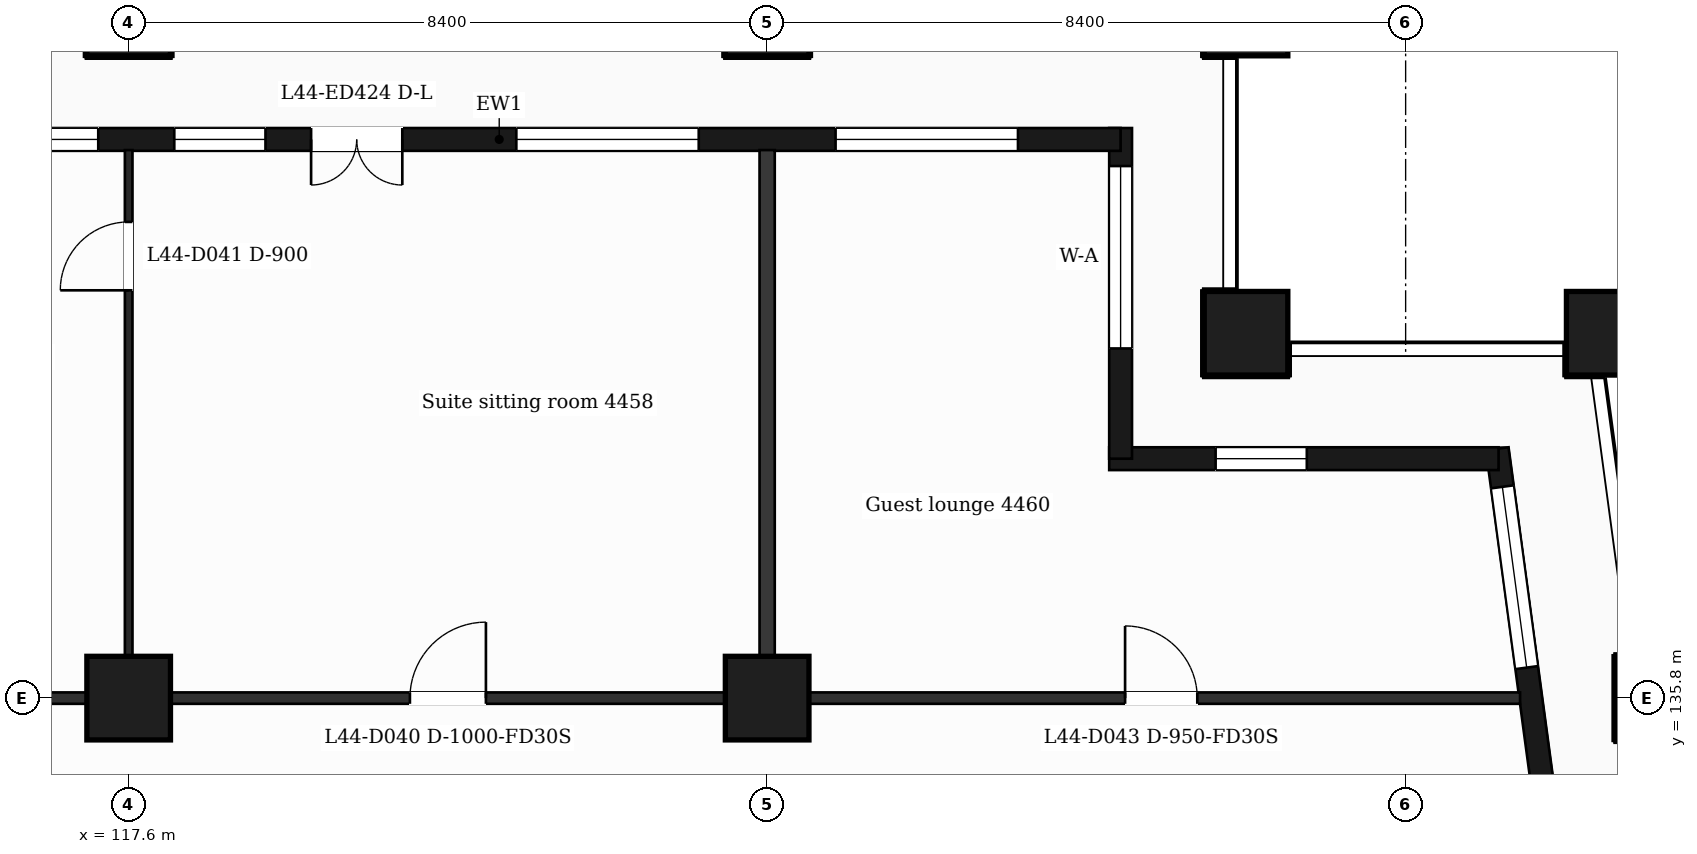
"""IFC4 building model, lengths in metres.
Left out: names, types, materials, properties, quantities, classifications, styles, units other than length and angle.
Written with IfcOpenShell. Run it as: python <this file> out.ifc"""

import sys

from ifc_helpers import new_model, si_unit, direction, frame, frame_2d, origin, origin_2d, place, context, subcontext, project, spatial, rectangle, extrude, element, fill, save


model = new_model("IFC4")
c1 = context("Model", 3, precision=1e-05, world=origin(), true_north=direction((0.0, 1.0)))
c2 = subcontext(c1, "Body", "Model", "MODEL_VIEW")
j1 = project(units=[si_unit("LENGTHUNIT", "METRE"), si_unit("PLANEANGLEUNIT", "RADIAN")], contexts=[c1])
p1 = place(None, origin())
s1 = spatial("IfcSite", under=j1, at=p1, CompositionType="ELEMENT")
p2 = place(p1, origin())
s2 = spatial("IfcBuilding", under=s1, at=p2, CompositionType="ELEMENT")
p3 = place(p2, frame((0.0, 0.0, 184.8)))
s3 = spatial("IfcBuildingStorey", under=s2, at=p3, CompositionType="ELEMENT", Elevation=184.8)
for number, where, z_axis, x_axis in (
    (1, (132.3, 140.6, 0.0), (0.0, 0.0, 1.0), (1.0, 0.0, 0.0)),
    (2, (137.065, 140.6, 0.0), (0.0, 0.0, 1.0), (1.0, 0.0, 0.0)),
    (3, (117.6, 135.8, 0.0), (0.0, 0.0, 1.0), (1.0, 0.0, 0.0)),
    (4, (126.0, 135.8, 0.0), (0.0, 0.0, 1.0), (1.0, 0.0, 0.0)),
    (5, (137.711, 135.8, 0.0), (0.0, 0.0, 1.0), (1.0, 0.0, 0.0)),
    (6, (117.6, 144.8, 0.0), (0.0, 0.0, 1.0), (1.0, 0.0, 0.0)),
    (7, (126.0, 144.8, 0.0), (0.0, 0.0, 1.0), (1.0, 0.0, 0.0)),
    (8, (132.3, 144.8, 0.0), (0.0, 0.0, 1.0), (1.0, 0.0, 0.0)),
):
    element("IfcColumn", number, at=place(p3, frame(where, z_axis=z_axis, x_axis=x_axis)), inside=s3, PredefinedType="COLUMN", context=c2, shape_type="SweptSolid", body=[
        extrude(rectangle(XDim=1.1, YDim=1.1, at=origin_2d()), origin(), (0.0, 0.0, 1.0), 3.7),
    ])
p4 = place(p3, frame((136.504, 132.4, 0.0), z_axis=(0.0, 0.0, 1.0), x_axis=(-0.133399697462, 0.99106231929, 0.0)))
e9 = element("IfcWall", 9, at=p4, inside=s3, PredefinedType="SOLIDWALL", context=c2, shape_type="SweptSolid", body=[
    extrude(rectangle(XDim=6.74, YDim=0.3, at=frame_2d((3.37, 0.0))), origin(), (0.0, 0.0, 1.0), 3.38),
])
p5 = place(p4, frame((1.115, 0.0, 0.0)))
e10 = element("IfcOpeningElement", 10, at=p5, cuts=e9, PredefinedType="OPENING", context=c2, shape_type="SweptSolid", body=[
    extrude(rectangle(XDim=1.2, YDim=2.4, at=frame_2d((0.6, 1.2))), frame((0.0, 0.16, 0.0), z_axis=(0.0, -1.0, 0.0), x_axis=(1.0, 0.0, 0.0)), (0.0, 0.0, 1.0), 0.32),
])
p6 = place(p4, frame((3.835, 0.0, 0.9)))
e11 = element("IfcOpeningElement", 11, at=p6, cuts=e9, PredefinedType="OPENING", context=c2, shape_type="SweptSolid", body=[
    extrude(rectangle(XDim=2.4, YDim=2.1, at=frame_2d((1.2, 1.05))), frame((0.0, 0.16, 0.0), z_axis=(0.0, -1.0, 0.0), x_axis=(1.0, 0.0, 0.0)), (0.0, 0.0, 1.0), 0.32),
])
p7 = place(p3, frame((135.623, 138.95, 0.0), z_axis=(0.0, 0.0, 1.0), x_axis=(-1.0, 0.0, 0.0)))
e12 = element("IfcWall", 12, at=p7, inside=s3, PredefinedType="SOLIDWALL", context=c2, shape_type="SweptSolid", body=[
    extrude(rectangle(XDim=5.123, YDim=0.3, at=frame_2d((2.561, 0.0))), origin(), (0.0, 0.0, 1.0), 3.38),
])
p8 = place(p7, frame((2.523, 0.0, 0.9)))
e13 = element("IfcOpeningElement", 13, at=p8, cuts=e12, PredefinedType="OPENING", context=c2, shape_type="SweptSolid", body=[
    extrude(rectangle(XDim=1.2, YDim=2.1, at=frame_2d((0.6, 1.05))), frame((0.0, 0.16, 0.0), z_axis=(0.0, -1.0, 0.0), x_axis=(1.0, 0.0, 0.0)), (0.0, 0.0, 1.0), 0.32),
])
p9 = place(p3, frame((130.65, 138.95, 0.0), z_axis=(0.0, 0.0, 1.0), x_axis=(0.0, 1.0, 0.0)))
e14 = element("IfcWall", 14, at=p9, inside=s3, PredefinedType="SOLIDWALL", context=c2, shape_type="SweptSolid", body=[
    extrude(rectangle(XDim=4.35, YDim=0.3, at=frame_2d((2.175, 0.0))), origin(), (0.0, 0.0, 1.0), 3.38),
])
p10 = place(p9, frame((1.45, 0.0, 0.9)))
e15 = element("IfcOpeningElement", 15, at=p10, cuts=e14, PredefinedType="OPENING", context=c2, shape_type="SweptSolid", body=[
    extrude(rectangle(XDim=2.4, YDim=2.1, at=frame_2d((1.2, 1.05))), frame((0.0, 0.16, 0.0), z_axis=(0.0, -1.0, 0.0), x_axis=(1.0, 0.0, 0.0)), (0.0, 0.0, 1.0), 0.32),
])
p11 = place(p3, frame((130.65, 143.15, 0.0), z_axis=(0.0, 0.0, 1.0), x_axis=(-1.0, 0.0, 0.0)))
e16 = element("IfcWall", 16, at=p11, inside=s3, PredefinedType="SOLIDWALL", context=c2, shape_type="SweptSolid", body=[
    extrude(rectangle(XDim=16.35, YDim=0.3, at=frame_2d((8.175, 0.0))), origin(), (0.0, 0.0, 1.0), 3.38),
])
p12 = place(p11, frame((1.35, 0.0, 0.9)))
e17 = element("IfcOpeningElement", 17, at=p12, cuts=e16, PredefinedType="OPENING", context=c2, shape_type="SweptSolid", body=[
    extrude(rectangle(XDim=2.4, YDim=2.1, at=frame_2d((1.2, 1.05))), frame((0.0, 0.16, 0.0), z_axis=(0.0, -1.0, 0.0), x_axis=(1.0, 0.0, 0.0)), (0.0, 0.0, 1.0), 0.32),
])
p13 = place(p11, frame((5.55, 0.0, 0.9)))
e18 = element("IfcOpeningElement", 18, at=p13, cuts=e16, PredefinedType="OPENING", context=c2, shape_type="SweptSolid", body=[
    extrude(rectangle(XDim=2.4, YDim=2.1, at=frame_2d((1.2, 1.05))), frame((0.0, 0.16, 0.0), z_axis=(0.0, -1.0, 0.0), x_axis=(1.0, 0.0, 0.0)), (0.0, 0.0, 1.0), 0.32),
])
p14 = place(p11, frame((9.45, 0.0, 0.0)))
e19 = element("IfcOpeningElement", 19, at=p14, cuts=e16, PredefinedType="OPENING", context=c2, shape_type="SweptSolid", body=[
    extrude(rectangle(XDim=1.2, YDim=2.4, at=frame_2d((0.6, 1.2))), frame((0.0, 0.16, 0.0), z_axis=(0.0, -1.0, 0.0), x_axis=(1.0, 0.0, 0.0)), (0.0, 0.0, 1.0), 0.32),
])
p15 = place(p11, frame((11.25, 0.0, 0.9)))
e20 = element("IfcOpeningElement", 20, at=p15, cuts=e16, PredefinedType="OPENING", context=c2, shape_type="SweptSolid", body=[
    extrude(rectangle(XDim=1.2, YDim=2.1, at=frame_2d((0.6, 1.05))), frame((0.0, 0.16, 0.0), z_axis=(0.0, -1.0, 0.0), x_axis=(1.0, 0.0, 0.0)), (0.0, 0.0, 1.0), 0.32),
])
p16 = place(p11, frame((13.45, 0.0, 0.9)))
e21 = element("IfcOpeningElement", 21, at=p16, cuts=e16, PredefinedType="OPENING", context=c2, shape_type="SweptSolid", body=[
    extrude(rectangle(XDim=2.4, YDim=2.1, at=frame_2d((1.2, 1.05))), frame((0.0, 0.16, 0.0), z_axis=(0.0, -1.0, 0.0), x_axis=(1.0, 0.0, 0.0)), (0.0, 0.0, 1.0), 0.32),
])
p17 = place(p3, frame((90.895, 135.8, 0.0), z_axis=(0.0, 0.0, 1.0), x_axis=(1.0, 0.0, 0.0)))
e22 = element("IfcWall", 22, at=p17, inside=s3, PredefinedType="PARTITIONING", context=c2, shape_type="SweptSolid", body=[
    extrude(rectangle(XDim=45.011, YDim=0.15, at=frame_2d((22.505, 0.0))), origin(), (0.0, 0.0, 1.0), 3.38),
])
p18 = place(p17, frame((6.906, 0.0, 0.0)))
e23 = element("IfcOpeningElement", 23, at=p18, cuts=e22, PredefinedType="OPENING", context=c2, shape_type="SweptSolid", body=[
    extrude(rectangle(XDim=1.0, YDim=2.1, at=frame_2d((0.5, 1.05))), frame((0.0, 0.085, 0.0), z_axis=(0.0, -1.0, 0.0), x_axis=(1.0, 0.0, 0.0)), (0.0, 0.0, 1.0), 0.17),
])
p19 = place(p17, frame((10.705, 0.0, 0.0)))
e24 = element("IfcOpeningElement", 24, at=p19, cuts=e22, PredefinedType="OPENING", context=c2, shape_type="SweptSolid", body=[
    extrude(rectangle(XDim=0.95, YDim=2.1, at=frame_2d((0.475, 1.05))), frame((0.0, 0.085, 0.0), z_axis=(0.0, -1.0, 0.0), x_axis=(1.0, 0.0, 0.0)), (0.0, 0.0, 1.0), 0.17),
])
p20 = place(p17, frame((16.555, 0.0, 0.0)))
e25 = element("IfcOpeningElement", 25, at=p20, cuts=e22, PredefinedType="OPENING", context=c2, shape_type="SweptSolid", body=[
    extrude(rectangle(XDim=0.95, YDim=2.1, at=frame_2d((0.475, 1.05))), frame((0.0, 0.085, 0.0), z_axis=(0.0, -1.0, 0.0), x_axis=(1.0, 0.0, 0.0)), (0.0, 0.0, 1.0), 0.17),
])
p21 = place(p17, frame((21.095, 0.0, 0.0)))
e26 = element("IfcOpeningElement", 26, at=p21, cuts=e22, PredefinedType="OPENING", context=c2, shape_type="SweptSolid", body=[
    extrude(rectangle(XDim=1.0, YDim=2.1, at=frame_2d((0.5, 1.05))), frame((0.0, 0.085, 0.0), z_axis=(0.0, -1.0, 0.0), x_axis=(1.0, 0.0, 0.0)), (0.0, 0.0, 1.0), 0.17),
])
p22 = place(p17, frame((30.406, 0.0, 0.0)))
e27 = element("IfcOpeningElement", 27, at=p22, cuts=e22, PredefinedType="OPENING", context=c2, shape_type="SweptSolid", body=[
    extrude(rectangle(XDim=1.0, YDim=2.1, at=frame_2d((0.5, 1.05))), frame((0.0, 0.085, 0.0), z_axis=(0.0, -1.0, 0.0), x_axis=(1.0, 0.0, 0.0)), (0.0, 0.0, 1.0), 0.17),
])
p23 = place(p17, frame((39.814, 0.0, 0.0)))
e28 = element("IfcOpeningElement", 28, at=p23, cuts=e22, PredefinedType="OPENING", context=c2, shape_type="SweptSolid", body=[
    extrude(rectangle(XDim=0.95, YDim=2.1, at=frame_2d((0.475, 1.05))), frame((0.0, 0.085, 0.0), z_axis=(0.0, -1.0, 0.0), x_axis=(1.0, 0.0, 0.0)), (0.0, 0.0, 1.0), 0.17),
])
p24 = place(p3, frame((117.6, 135.875, 0.0), z_axis=(0.0, 0.0, 1.0), x_axis=(0.0, 1.0, 0.0)))
e29 = element("IfcWall", 29, at=p24, inside=s3, PredefinedType="PARTITIONING", context=c2, shape_type="SweptSolid", body=[
    extrude(rectangle(XDim=7.135, YDim=0.1, at=frame_2d((3.567, 0.0))), origin(), (0.0, 0.0, 1.0), 3.38),
])
p25 = place(p24, frame((5.29, 0.0, 0.0)))
e30 = element("IfcOpeningElement", 30, at=p25, cuts=e29, PredefinedType="OPENING", context=c2, shape_type="SweptSolid", body=[
    extrude(rectangle(XDim=0.9, YDim=2.1, at=frame_2d((0.45, 1.05))), frame((0.0, 0.06, 0.0), z_axis=(0.0, -1.0, 0.0), x_axis=(1.0, 0.0, 0.0)), (0.0, 0.0, 1.0), 0.12),
])
p26 = place(p3, frame((126.0, 135.875, 0.0), z_axis=(0.0, 0.0, 1.0), x_axis=(0.0, 1.0, 0.0)))
e31 = element("IfcWall", 31, at=p26, inside=s3, PredefinedType="PARTITIONING", context=c2, shape_type="SweptSolid", body=[
    extrude(rectangle(XDim=7.135, YDim=0.2, at=frame_2d((3.567, 0.0))), origin(), (0.0, 0.0, 1.0), 3.38),
])
p27 = place(p6, origin())
e32 = element("IfcWindow", 32, at=p27, inside=s3, PartitioningType="SINGLE_PANEL", PredefinedType="WINDOW", context=c2, shape_type="SweptSolid", body=[
    extrude(rectangle(XDim=2.4, YDim=2.1, at=frame_2d((1.2, 1.05))), frame((0.0, 0.03, 0.0), z_axis=(0.0, -1.0, 0.0), x_axis=(1.0, 0.0, 0.0)), (0.0, 0.0, 1.0), 0.06),
])
fill(e11, e32)
p28 = place(p8, origin())
e33 = element("IfcWindow", 33, at=p28, inside=s3, PartitioningType="SINGLE_PANEL", PredefinedType="WINDOW", context=c2, shape_type="SweptSolid", body=[
    extrude(rectangle(XDim=1.2, YDim=2.1, at=frame_2d((0.6, 1.05))), frame((0.0, 0.03, 0.0), z_axis=(0.0, -1.0, 0.0), x_axis=(1.0, 0.0, 0.0)), (0.0, 0.0, 1.0), 0.06),
])
fill(e13, e33)
p29 = place(p10, origin())
e34 = element("IfcWindow", 34, at=p29, inside=s3, PartitioningType="SINGLE_PANEL", PredefinedType="WINDOW", context=c2, shape_type="SweptSolid", body=[
    extrude(rectangle(XDim=2.4, YDim=2.1, at=frame_2d((1.2, 1.05))), frame((0.0, 0.03, 0.0), z_axis=(0.0, -1.0, 0.0), x_axis=(1.0, 0.0, 0.0)), (0.0, 0.0, 1.0), 0.06),
])
fill(e15, e34)
p30 = place(p12, origin())
e35 = element("IfcWindow", 35, at=p30, inside=s3, PartitioningType="SINGLE_PANEL", PredefinedType="WINDOW", context=c2, shape_type="SweptSolid", body=[
    extrude(rectangle(XDim=2.4, YDim=2.1, at=frame_2d((1.2, 1.05))), frame((0.0, 0.03, 0.0), z_axis=(0.0, -1.0, 0.0), x_axis=(1.0, 0.0, 0.0)), (0.0, 0.0, 1.0), 0.06),
])
fill(e17, e35)
p31 = place(p13, origin())
e36 = element("IfcWindow", 36, at=p31, inside=s3, PartitioningType="SINGLE_PANEL", PredefinedType="WINDOW", context=c2, shape_type="SweptSolid", body=[
    extrude(rectangle(XDim=2.4, YDim=2.1, at=frame_2d((1.2, 1.05))), frame((0.0, 0.03, 0.0), z_axis=(0.0, -1.0, 0.0), x_axis=(1.0, 0.0, 0.0)), (0.0, 0.0, 1.0), 0.06),
])
fill(e18, e36)
p32 = place(p14, origin())
e37 = element("IfcDoor", 37, at=p32, inside=s3, OperationType="DOUBLE_DOOR_SINGLE_SWING", PredefinedType="DOOR", context=c2, shape_type="SweptSolid", body=[
    extrude(rectangle(XDim=1.2, YDim=2.4, at=frame_2d((0.6, 1.2))), frame((0.0, 0.025, 0.0), z_axis=(0.0, -1.0, 0.0), x_axis=(1.0, 0.0, 0.0)), (0.0, 0.0, 1.0), 0.05),
])
fill(e19, e37)
p33 = place(p15, origin())
e38 = element("IfcWindow", 38, at=p33, inside=s3, PartitioningType="SINGLE_PANEL", PredefinedType="WINDOW", context=c2, shape_type="SweptSolid", body=[
    extrude(rectangle(XDim=1.2, YDim=2.1, at=frame_2d((0.6, 1.05))), frame((0.0, 0.03, 0.0), z_axis=(0.0, -1.0, 0.0), x_axis=(1.0, 0.0, 0.0)), (0.0, 0.0, 1.0), 0.06),
])
fill(e20, e38)
p34 = place(p16, origin())
e39 = element("IfcWindow", 39, at=p34, inside=s3, PartitioningType="SINGLE_PANEL", PredefinedType="WINDOW", context=c2, shape_type="SweptSolid", body=[
    extrude(rectangle(XDim=2.4, YDim=2.1, at=frame_2d((1.2, 1.05))), frame((0.0, 0.03, 0.0), z_axis=(0.0, -1.0, 0.0), x_axis=(1.0, 0.0, 0.0)), (0.0, 0.0, 1.0), 0.06),
])
fill(e21, e39)
p35 = place(p22, origin())
e40 = element("IfcDoor", 40, at=p35, inside=s3, OperationType="SINGLE_SWING_RIGHT", PredefinedType="DOOR", context=c2, shape_type="SweptSolid", body=[
    extrude(rectangle(XDim=1.0, YDim=2.1, at=frame_2d((0.5, 1.05))), frame((0.0, 0.025, 0.0), z_axis=(0.0, -1.0, 0.0), x_axis=(1.0, 0.0, 0.0)), (0.0, 0.0, 1.0), 0.05),
])
fill(e27, e40)
p36 = place(p25, origin())
e41 = element("IfcDoor", 41, at=p36, inside=s3, OperationType="SINGLE_SWING_LEFT", PredefinedType="DOOR", context=c2, shape_type="SweptSolid", body=[
    extrude(rectangle(XDim=0.9, YDim=2.1, at=frame_2d((0.45, 1.05))), frame((0.0, 0.025, 0.0), z_axis=(0.0, -1.0, 0.0), x_axis=(1.0, 0.0, 0.0)), (0.0, 0.0, 1.0), 0.05),
])
fill(e30, e41)
p37 = place(p23, origin())
e42 = element("IfcDoor", 42, at=p37, inside=s3, OperationType="SINGLE_SWING_LEFT", PredefinedType="DOOR", context=c2, shape_type="SweptSolid", body=[
    extrude(rectangle(XDim=0.95, YDim=2.1, at=frame_2d((0.475, 1.05))), frame((0.0, 0.025, 0.0), z_axis=(0.0, -1.0, 0.0), x_axis=(1.0, 0.0, 0.0)), (0.0, 0.0, 1.0), 0.05),
])
fill(e28, e42)
save(model, sys.argv[1])
